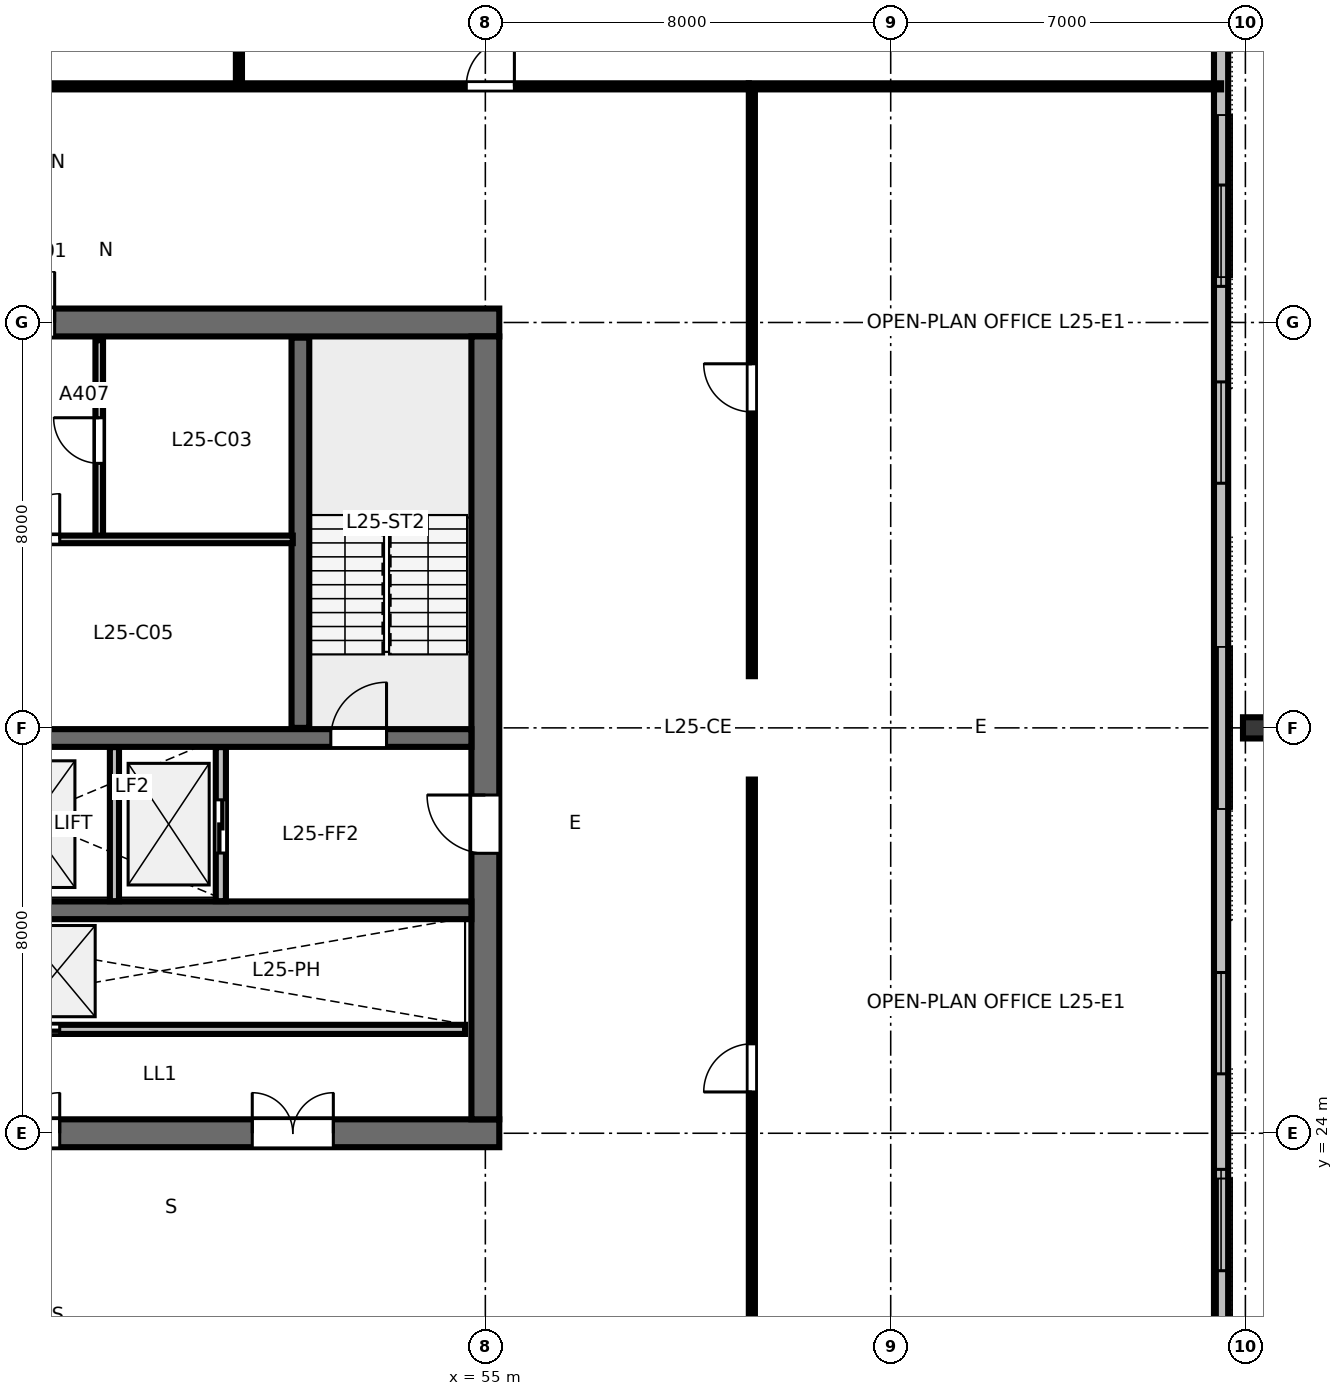
"""IFC4 building model, lengths in metres.
Left out: names, types, materials, properties, quantities, classifications, styles, units other than length and angle.
Written with IfcOpenShell. Run it as: python <this file> out.ifc"""

import sys

from ifc_helpers import new_model, si_unit, direction, frame, frame_2d, origin, origin_2d, place, context, subcontext, project, spatial, rectangle, i_section, extrude, element, fill, save


model = new_model("IFC4")
c1 = context("Model", 3, precision=1e-05, world=origin(), true_north=direction((0.0, 1.0)))
c2 = subcontext(c1, "Body", "Model", "MODEL_VIEW")
j1 = project(units=[si_unit("LENGTHUNIT", "METRE"), si_unit("PLANEANGLEUNIT", "RADIAN")], contexts=[c1])
p1 = place(None, origin())
s1 = spatial("IfcSite", under=j1, at=p1, CompositionType="ELEMENT")
p2 = place(p1, origin())
s2 = spatial("IfcBuilding", under=s1, at=p2, CompositionType="ELEMENT")
p3 = place(p2, frame((0.0, 0.0, 98.8)))
s3 = spatial("IfcBuildingStorey", under=s2, at=p3, CompositionType="ELEMENT", Elevation=98.8)
p4 = place(p3, frame((36.725, 24.0, 0.0), z_axis=(0.0, 0.0, 1.0), x_axis=(1.0, 0.0, 0.0)))
e1 = element("IfcWall", 1, at=p4, inside=s3, PredefinedType="SHEAR", context=c2, shape_type="SweptSolid", body=[
    extrude(rectangle(XDim=18.55, YDim=0.55, at=frame_2d((9.275, 0.0))), origin(), (0.0, 0.0, 1.0), 3.36),
])
p5 = place(p4, frame((8.275, 0.0, 0.0)))
e2 = element("IfcOpeningElement", 2, at=p5, cuts=e1, PredefinedType="OPENING", context=c2, shape_type="SweptSolid", body=[
    extrude(rectangle(XDim=1.6, YDim=2.15, at=frame_2d((0.8, 1.075))), frame((0.0, 0.285, 0.0), z_axis=(0.0, -1.0, 0.0), x_axis=(1.0, 0.0, 0.0)), (0.0, 0.0, 1.0), 0.57),
])
p6 = place(p4, frame((13.675, 0.0, 0.0)))
e3 = element("IfcOpeningElement", 3, at=p6, cuts=e1, PredefinedType="OPENING", context=c2, shape_type="SweptSolid", body=[
    extrude(rectangle(XDim=1.6, YDim=2.15, at=frame_2d((0.8, 1.075))), frame((0.0, 0.285, 0.0), z_axis=(0.0, -1.0, 0.0), x_axis=(1.0, 0.0, 0.0)), (0.0, 0.0, 1.0), 0.57),
])
p7 = place(p3, frame((36.725, 40.0, 0.0), z_axis=(0.0, 0.0, 1.0), x_axis=(1.0, 0.0, 0.0)))
e4 = element("IfcWall", 4, at=p7, inside=s3, PredefinedType="SHEAR", context=c2, shape_type="SweptSolid", body=[
    extrude(rectangle(XDim=18.55, YDim=0.55, at=frame_2d((9.275, 0.0))), origin(), (0.0, 0.0, 1.0), 3.36),
])
p8 = place(p7, frame((8.775, 0.0, 0.0)))
e5 = element("IfcOpeningElement", 5, at=p8, cuts=e4, PredefinedType="OPENING", context=c2, shape_type="SweptSolid", body=[
    extrude(rectangle(XDim=1.0, YDim=2.15, at=frame_2d((0.5, 1.075))), frame((0.0, 0.285, 0.0), z_axis=(0.0, -1.0, 0.0), x_axis=(1.0, 0.0, 0.0)), (0.0, 0.0, 1.0), 0.57),
])
p9 = place(p3, frame((55.0, 24.275, 0.0), z_axis=(0.0, 0.0, 1.0), x_axis=(0.0, 1.0, 0.0)))
e6 = element("IfcWall", 6, at=p9, inside=s3, PredefinedType="SHEAR", context=c2, shape_type="SweptSolid", body=[
    extrude(rectangle(XDim=15.45, YDim=0.55, at=frame_2d((7.725, 0.0))), origin(), (0.0, 0.0, 1.0), 3.36),
])
p10 = place(p9, frame((5.25, 0.0, 0.0)))
e7 = element("IfcOpeningElement", 7, at=p10, cuts=e6, PredefinedType="OPENING", context=c2, shape_type="SweptSolid", body=[
    extrude(rectangle(XDim=1.15, YDim=2.15, at=frame_2d((0.575, 1.075))), frame((0.0, 0.285, 0.0), z_axis=(0.0, -1.0, 0.0), x_axis=(1.0, 0.0, 0.0)), (0.0, 0.0, 1.0), 0.57),
])
p11 = place(p3, frame((37.275, 31.8, 0.0), z_axis=(0.0, 0.0, 1.0), x_axis=(1.0, 0.0, 0.0)))
e8 = element("IfcWall", 8, at=p11, inside=s3, PredefinedType="SHEAR", context=c2, shape_type="SweptSolid", body=[
    extrude(rectangle(XDim=17.45, YDim=0.35, at=frame_2d((8.725, 0.0))), origin(), (0.0, 0.0, 1.0), 3.36),
])
p12 = place(p11, frame((0.775, 0.0, 0.0)))
e9 = element("IfcOpeningElement", 9, at=p12, cuts=e8, PredefinedType="OPENING", context=c2, shape_type="SweptSolid", body=[
    extrude(rectangle(XDim=1.1, YDim=2.15, at=frame_2d((0.55, 1.075))), frame((0.0, 0.185, 0.0), z_axis=(0.0, -1.0, 0.0), x_axis=(1.0, 0.0, 0.0)), (0.0, 0.0, 1.0), 0.37),
])
p13 = place(p11, frame((14.675, 0.0, 0.0)))
e10 = element("IfcOpeningElement", 10, at=p13, cuts=e8, PredefinedType="OPENING", context=c2, shape_type="SweptSolid", body=[
    extrude(rectangle(XDim=1.1, YDim=2.15, at=frame_2d((0.55, 1.075))), frame((0.0, 0.185, 0.0), z_axis=(0.0, -1.0, 0.0), x_axis=(1.0, 0.0, 0.0)), (0.0, 0.0, 1.0), 0.37),
])
p14 = place(p3, frame((37.275, 28.4, 0.0), z_axis=(0.0, 0.0, 1.0), x_axis=(1.0, 0.0, 0.0)))
e11 = element("IfcWall", 11, at=p14, inside=s3, PredefinedType="SHEAR", context=c2, shape_type="SweptSolid", body=[
    extrude(rectangle(XDim=17.45, YDim=0.35, at=frame_2d((8.725, 0.0))), origin(), (0.0, 0.0, 1.0), 3.36),
])
p15 = place(p3, frame((70.18, 32.0, 0.0), z_axis=(0.0, 0.0, 1.0), x_axis=(0.0, 1.0, 0.0)))
e12 = element("IfcColumn", 12, at=p15, inside=s3, PredefinedType="COLUMN", context=c2, shape_type="SweptSolid", body=[
    extrude(i_section(OverallWidth=0.418, OverallDepth=0.455, WebThickness=0.042, FlangeThickness=0.068, FilletRadius=0.025, at=origin_2d()), origin(), (0.0, 0.0, 1.0), 3.358),
])
p16 = place(p3, frame((69.52, 15.36, 0.0), z_axis=(0.0, 0.0, 1.0), x_axis=(0.0, 1.0, 0.0)))
e13 = element("IfcWall", 13, at=p16, inside=s3, PredefinedType="STANDARD", context=c2, shape_type="SweptSolid", body=[
    extrude(rectangle(XDim=33.28, YDim=0.28, at=frame_2d((16.64, 0.0))), origin(), (0.0, 0.0, 1.0), 3.36),
])
p17 = place(p16, frame((5.927, 0.0, 0.8)))
e14 = element("IfcOpeningElement", 14, at=p17, cuts=e13, PredefinedType="OPENING", context=c2, shape_type="SweptSolid", body=[
    extrude(rectangle(XDim=2.0, YDim=1.95, at=frame_2d((1.0, 0.975))), frame((0.0, 0.15, 0.0), z_axis=(0.0, -1.0, 0.0), x_axis=(1.0, 0.0, 0.0)), (0.0, 0.0, 1.0), 0.3),
])
p18 = place(p16, frame((9.812, 0.0, 0.8)))
e15 = element("IfcOpeningElement", 15, at=p18, cuts=e13, PredefinedType="OPENING", context=c2, shape_type="SweptSolid", body=[
    extrude(rectangle(XDim=2.0, YDim=1.95, at=frame_2d((1.0, 0.975))), frame((0.0, 0.15, 0.0), z_axis=(0.0, -1.0, 0.0), x_axis=(1.0, 0.0, 0.0)), (0.0, 0.0, 1.0), 0.3),
])
p19 = place(p16, frame((21.468, 0.0, 0.8)))
e16 = element("IfcOpeningElement", 16, at=p19, cuts=e13, PredefinedType="OPENING", context=c2, shape_type="SweptSolid", body=[
    extrude(rectangle(XDim=2.0, YDim=1.95, at=frame_2d((1.0, 0.975))), frame((0.0, 0.15, 0.0), z_axis=(0.0, -1.0, 0.0), x_axis=(1.0, 0.0, 0.0)), (0.0, 0.0, 1.0), 0.3),
])
p20 = place(p16, frame((25.353, 0.0, 0.8)))
e17 = element("IfcOpeningElement", 17, at=p20, cuts=e13, PredefinedType="OPENING", context=c2, shape_type="SweptSolid", body=[
    extrude(rectangle(XDim=2.0, YDim=1.95, at=frame_2d((1.0, 0.975))), frame((0.0, 0.15, 0.0), z_axis=(0.0, -1.0, 0.0), x_axis=(1.0, 0.0, 0.0)), (0.0, 0.0, 1.0), 0.3),
])
p21 = place(p3, frame((51.35, 32.0, 0.0), z_axis=(0.0, 0.0, 1.0), x_axis=(0.0, 1.0, 0.0)))
e18 = element("IfcWall", 18, at=p21, inside=s3, PredefinedType="SHEAR", context=c2, shape_type="SweptSolid", body=[
    extrude(rectangle(XDim=7.7, YDim=0.35, at=frame_2d((3.85, 0.0))), origin(), (0.0, 0.0, 1.0), 3.6),
])
p22 = place(p3, frame((47.38, 35.72, 0.0), z_axis=(0.0, 0.0, 1.0), x_axis=(0.0, 1.0, 0.0)))
e19 = element("IfcWall", 19, at=p22, inside=s3, PredefinedType="PARTITIONING", context=c2, shape_type="SweptSolid", body=[
    extrude(rectangle(XDim=3.93, YDim=0.15, at=frame_2d((1.965, 0.0))), origin(), (0.0, 0.0, 1.0), 3.36),
])
p23 = place(p22, frame((1.5, 0.0, 0.0)))
e20 = element("IfcOpeningElement", 20, at=p23, cuts=e19, PredefinedType="OPENING", context=c2, shape_type="SweptSolid", body=[
    extrude(rectangle(XDim=0.9, YDim=2.15, at=frame_2d((0.45, 1.075))), frame((0.0, 0.085, 0.0), z_axis=(0.0, -1.0, 0.0), x_axis=(1.0, 0.0, 0.0)), (0.0, 0.0, 1.0), 0.17),
])
p24 = place(p3, frame((40.8, 35.72, 0.0), z_axis=(0.0, 0.0, 1.0), x_axis=(1.0, 0.0, 0.0)))
e21 = element("IfcWall", 21, at=p24, inside=s3, PredefinedType="PARTITIONING", context=c2, shape_type="SweptSolid", body=[
    extrude(rectangle(XDim=10.4, YDim=0.15, at=frame_2d((5.2, 0.0))), origin(), (0.0, 0.0, 1.0), 3.36),
])
p25 = place(p24, frame((4.9, 0.0, 0.0)))
e22 = element("IfcOpeningElement", 22, at=p25, cuts=e21, PredefinedType="OPENING", context=c2, shape_type="SweptSolid", body=[
    extrude(rectangle(XDim=0.9, YDim=2.15, at=frame_2d((0.45, 1.075))), frame((0.0, 0.085, 0.0), z_axis=(0.0, -1.0, 0.0), x_axis=(1.0, 0.0, 0.0)), (0.0, 0.0, 1.0), 0.17),
])
p26 = place(p3, frame((49.78, 28.58, 0.0), z_axis=(0.0, 0.0, 1.0), x_axis=(0.0, 1.0, 0.0)))
e23 = element("IfcWall", 23, at=p26, inside=s3, PredefinedType="PARTITIONING", context=c2, shape_type="SweptSolid", body=[
    extrude(rectangle(XDim=3.04, YDim=0.2, at=frame_2d((1.52, 0.0))), origin(), (0.0, 0.0, 1.0), 3.36),
])
p27 = place(p26, frame((0.95, 0.0, 0.0)))
e24 = element("IfcOpeningElement", 24, at=p27, cuts=e23, PredefinedType="OPENING", context=c2, shape_type="SweptSolid", body=[
    extrude(rectangle(XDim=1.05, YDim=2.15, at=frame_2d((0.525, 1.075))), frame((0.0, 0.11, 0.0), z_axis=(0.0, -1.0, 0.0), x_axis=(1.0, 0.0, 0.0)), (0.0, 0.0, 1.0), 0.22),
])
p28 = place(p3, frame((47.68, 28.58, 0.0), z_axis=(0.0, 0.0, 1.0), x_axis=(0.0, 1.0, 0.0)))
e25 = element("IfcWall", 25, at=p28, inside=s3, PredefinedType="PARTITIONING", context=c2, shape_type="SweptSolid", body=[
    extrude(rectangle(XDim=3.04, YDim=0.18, at=frame_2d((1.52, 0.0))), origin(), (0.0, 0.0, 1.0), 3.36),
])
p29 = place(p3, frame((42.55, 26.05, 0.0), z_axis=(0.0, 0.0, 1.0), x_axis=(1.0, 0.0, 0.0)))
e26 = element("IfcWall", 26, at=p29, inside=s3, PredefinedType="PARTITIONING", context=c2, shape_type="SweptSolid", body=[
    extrude(rectangle(XDim=12.05, YDim=0.18, at=frame_2d((6.025, 0.0))), origin(), (0.0, 0.0, 1.0), 3.36),
])
p30 = place(p29, frame((1.1, 0.0, 0.0)))
e27 = element("IfcOpeningElement", 27, at=p30, cuts=e26, PredefinedType="OPENING", context=c2, shape_type="SweptSolid", body=[
    extrude(rectangle(XDim=1.05, YDim=2.15, at=frame_2d((0.525, 1.075))), frame((0.0, 0.1, 0.0), z_axis=(0.0, -1.0, 0.0), x_axis=(1.0, 0.0, 0.0)), (0.0, 0.0, 1.0), 0.2),
])
p31 = place(p29, frame((3.0, 0.0, 0.0)))
e28 = element("IfcOpeningElement", 28, at=p31, cuts=e26, PredefinedType="OPENING", context=c2, shape_type="SweptSolid", body=[
    extrude(rectangle(XDim=1.05, YDim=2.15, at=frame_2d((0.525, 1.075))), frame((0.0, 0.1, 0.0), z_axis=(0.0, -1.0, 0.0), x_axis=(1.0, 0.0, 0.0)), (0.0, 0.0, 1.0), 0.2),
])
p32 = place(p3, frame((50.137, 44.66, 0.0), z_axis=(0.0, 0.0, 1.0), x_axis=(0.0, 1.0, 0.0)))
e29 = element("IfcWall", 29, at=p32, inside=s3, PredefinedType="PARTITIONING", context=c2, shape_type="SweptSolid", body=[
    extrude(rectangle(XDim=8.06, YDim=0.12, at=frame_2d((4.03, 0.0))), origin(), (0.0, 0.0, 1.0), 2.64),
])
p33 = place(p32, frame((1.4, 0.0, 0.0)))
e30 = element("IfcOpeningElement", 30, at=p33, cuts=e29, PredefinedType="OPENING", context=c2, shape_type="SweptSolid", body=[
    extrude(rectangle(XDim=0.9, YDim=2.15, at=frame_2d((0.45, 1.075))), frame((0.0, 0.07, 0.0), z_axis=(0.0, -1.0, 0.0), x_axis=(1.0, 0.0, 0.0)), (0.0, 0.0, 1.0), 0.14),
])
p34 = place(p3, frame((31.8, 44.66, 0.0), z_axis=(0.0, 0.0, 1.0), x_axis=(1.0, 0.0, 0.0)))
e31 = element("IfcWall", 31, at=p34, inside=s3, PredefinedType="PARTITIONING", context=c2, shape_type="SweptSolid", body=[
    extrude(rectangle(XDim=28.4, YDim=0.12, at=frame_2d((14.2, 0.0))), origin(), (0.0, 0.0, 1.0), 2.64),
])
p35 = place(p34, frame((3.452, 0.0, 0.0)))
e32 = element("IfcOpeningElement", 32, at=p35, cuts=e31, PredefinedType="OPENING", context=c2, shape_type="SweptSolid", body=[
    extrude(rectangle(XDim=0.95, YDim=2.15, at=frame_2d((0.475, 1.075))), frame((0.0, 0.07, 0.0), z_axis=(0.0, -1.0, 0.0), x_axis=(1.0, 0.0, 0.0)), (0.0, 0.0, 1.0), 0.14),
])
p36 = place(p34, frame((12.551, 0.0, 0.0)))
e33 = element("IfcOpeningElement", 33, at=p36, cuts=e31, PredefinedType="OPENING", context=c2, shape_type="SweptSolid", body=[
    extrude(rectangle(XDim=0.95, YDim=2.15, at=frame_2d((0.475, 1.075))), frame((0.0, 0.07, 0.0), z_axis=(0.0, -1.0, 0.0), x_axis=(1.0, 0.0, 0.0)), (0.0, 0.0, 1.0), 0.14),
])
p37 = place(p34, frame((22.823, 0.0, 0.0)))
e34 = element("IfcOpeningElement", 34, at=p37, cuts=e31, PredefinedType="OPENING", context=c2, shape_type="SweptSolid", body=[
    extrude(rectangle(XDim=0.95, YDim=2.15, at=frame_2d((0.475, 1.075))), frame((0.0, 0.07, 0.0), z_axis=(0.0, -1.0, 0.0), x_axis=(1.0, 0.0, 0.0)), (0.0, 0.0, 1.0), 0.14),
])
p38 = place(p3, frame((60.26, 19.4, 0.0), z_axis=(0.0, 0.0, 1.0), x_axis=(0.0, 1.0, 0.0)))
e35 = element("IfcWall", 35, at=p38, inside=s3, PredefinedType="PARTITIONING", context=c2, shape_type="SweptSolid", body=[
    extrude(rectangle(XDim=11.58, YDim=0.12, at=frame_2d((5.79, 0.0))), origin(), (0.0, 0.0, 1.0), 2.64),
])
p39 = place(p38, frame((5.415, 0.0, 0.0)))
e36 = element("IfcOpeningElement", 36, at=p39, cuts=e35, PredefinedType="OPENING", context=c2, shape_type="SweptSolid", body=[
    extrude(rectangle(XDim=0.95, YDim=2.15, at=frame_2d((0.475, 1.075))), frame((0.0, 0.07, 0.0), z_axis=(0.0, -1.0, 0.0), x_axis=(1.0, 0.0, 0.0)), (0.0, 0.0, 1.0), 0.14),
])
p40 = place(p3, frame((60.26, 33.02, 0.0), z_axis=(0.0, 0.0, 1.0), x_axis=(0.0, 1.0, 0.0)))
e37 = element("IfcWall", 37, at=p40, inside=s3, PredefinedType="PARTITIONING", context=c2, shape_type="SweptSolid", body=[
    extrude(rectangle(XDim=11.58, YDim=0.12, at=frame_2d((5.79, 0.0))), origin(), (0.0, 0.0, 1.0), 2.64),
])
p41 = place(p40, frame((5.215, 0.0, 0.0)))
e38 = element("IfcOpeningElement", 38, at=p41, cuts=e37, PredefinedType="OPENING", context=c2, shape_type="SweptSolid", body=[
    extrude(rectangle(XDim=0.95, YDim=2.15, at=frame_2d((0.475, 1.075))), frame((0.0, 0.07, 0.0), z_axis=(0.0, -1.0, 0.0), x_axis=(1.0, 0.0, 0.0)), (0.0, 0.0, 1.0), 0.14),
])
p42 = place(p3, frame((60.2, 44.66, 0.0), z_axis=(0.0, 0.0, 1.0), x_axis=(1.0, 0.0, 0.0)))
e39 = element("IfcWall", 39, at=p42, inside=s3, PredefinedType="PARTITIONING", context=c2, shape_type="SweptSolid", body=[
    extrude(rectangle(XDim=9.32, YDim=0.12, at=frame_2d((4.66, 0.0))), origin(), (0.0, 0.0, 1.0), 2.64),
])
p43 = place(p17, origin())
e40 = element("IfcWindow", 40, at=p43, inside=s3, PartitioningType="SINGLE_PANEL", PredefinedType="WINDOW", context=c2, shape_type="SweptSolid", body=[
    extrude(rectangle(XDim=2.0, YDim=1.95, at=frame_2d((1.0, 0.975))), frame((0.0, 0.03, 0.0), z_axis=(0.0, -1.0, 0.0), x_axis=(1.0, 0.0, 0.0)), (0.0, 0.0, 1.0), 0.06),
])
fill(e14, e40)
p44 = place(p18, origin())
e41 = element("IfcWindow", 41, at=p44, inside=s3, PartitioningType="SINGLE_PANEL", PredefinedType="WINDOW", context=c2, shape_type="SweptSolid", body=[
    extrude(rectangle(XDim=2.0, YDim=1.95, at=frame_2d((1.0, 0.975))), frame((0.0, 0.03, 0.0), z_axis=(0.0, -1.0, 0.0), x_axis=(1.0, 0.0, 0.0)), (0.0, 0.0, 1.0), 0.06),
])
fill(e15, e41)
p45 = place(p19, origin())
e42 = element("IfcWindow", 42, at=p45, inside=s3, PartitioningType="SINGLE_PANEL", PredefinedType="WINDOW", context=c2, shape_type="SweptSolid", body=[
    extrude(rectangle(XDim=2.0, YDim=1.95, at=frame_2d((1.0, 0.975))), frame((0.0, 0.03, 0.0), z_axis=(0.0, -1.0, 0.0), x_axis=(1.0, 0.0, 0.0)), (0.0, 0.0, 1.0), 0.06),
])
fill(e16, e42)
p46 = place(p20, origin())
e43 = element("IfcWindow", 43, at=p46, inside=s3, PartitioningType="SINGLE_PANEL", PredefinedType="WINDOW", context=c2, shape_type="SweptSolid", body=[
    extrude(rectangle(XDim=2.0, YDim=1.95, at=frame_2d((1.0, 0.975))), frame((0.0, 0.03, 0.0), z_axis=(0.0, -1.0, 0.0), x_axis=(1.0, 0.0, 0.0)), (0.0, 0.0, 1.0), 0.06),
])
fill(e17, e43)
p47 = place(p13, origin())
e44 = element("IfcDoor", 44, at=p47, inside=s3, OperationType="SINGLE_SWING_RIGHT", PredefinedType="DOOR", context=c2, shape_type="SweptSolid", body=[
    extrude(rectangle(XDim=1.1, YDim=2.15, at=frame_2d((0.55, 1.075))), frame((0.0, 0.025, 0.0), z_axis=(0.0, -1.0, 0.0), x_axis=(1.0, 0.0, 0.0)), (0.0, 0.0, 1.0), 0.05),
])
fill(e10, e44)
p48 = place(p8, origin())
e45 = element("IfcDoor", 45, at=p48, inside=s3, OperationType="SINGLE_SWING_RIGHT", PredefinedType="DOOR", context=c2, shape_type="SweptSolid", body=[
    extrude(rectangle(XDim=1.0, YDim=2.15, at=frame_2d((0.5, 1.075))), frame((0.0, 0.025, 0.0), z_axis=(0.0, -1.0, 0.0), x_axis=(1.0, 0.0, 0.0)), (0.0, 0.0, 1.0), 0.05),
])
fill(e5, e45)
p49 = place(p10, origin())
e46 = element("IfcDoor", 46, at=p49, inside=s3, OperationType="SINGLE_SWING_RIGHT", PredefinedType="DOOR", context=c2, shape_type="SweptSolid", body=[
    extrude(rectangle(XDim=1.15, YDim=2.15, at=frame_2d((0.575, 1.075))), frame((0.0, 0.025, 0.0), z_axis=(0.0, -1.0, 0.0), x_axis=(1.0, 0.0, 0.0)), (0.0, 0.0, 1.0), 0.05),
])
fill(e7, e46)
p50 = place(p5, origin())
e47 = element("IfcDoor", 47, at=p50, inside=s3, OperationType="DOUBLE_DOOR_SINGLE_SWING", PredefinedType="DOOR", context=c2, shape_type="SweptSolid", body=[
    extrude(rectangle(XDim=1.6, YDim=2.15, at=frame_2d((0.8, 1.075))), frame((0.0, 0.025, 0.0), z_axis=(0.0, -1.0, 0.0), x_axis=(1.0, 0.0, 0.0)), (0.0, 0.0, 1.0), 0.05),
])
fill(e2, e47)
p51 = place(p6, origin())
e48 = element("IfcDoor", 48, at=p51, inside=s3, OperationType="DOUBLE_DOOR_SINGLE_SWING", PredefinedType="DOOR", context=c2, shape_type="SweptSolid", body=[
    extrude(rectangle(XDim=1.6, YDim=2.15, at=frame_2d((0.8, 1.075))), frame((0.0, 0.025, 0.0), z_axis=(0.0, -1.0, 0.0), x_axis=(1.0, 0.0, 0.0)), (0.0, 0.0, 1.0), 0.05),
])
fill(e3, e48)
p52 = place(p23, origin())
e49 = element("IfcDoor", 49, at=p52, inside=s3, OperationType="SINGLE_SWING_RIGHT", PredefinedType="DOOR", context=c2, shape_type="SweptSolid", body=[
    extrude(rectangle(XDim=0.9, YDim=2.15, at=frame_2d((0.45, 1.075))), frame((0.0, 0.025, 0.0), z_axis=(0.0, -1.0, 0.0), x_axis=(1.0, 0.0, 0.0)), (0.0, 0.0, 1.0), 0.05),
])
fill(e20, e49)
p53 = place(p25, origin())
e50 = element("IfcDoor", 50, at=p53, inside=s3, OperationType="SINGLE_SWING_RIGHT", PredefinedType="DOOR", context=c2, shape_type="SweptSolid", body=[
    extrude(rectangle(XDim=0.9, YDim=2.15, at=frame_2d((0.45, 1.075))), frame((0.0, 0.025, 0.0), z_axis=(0.0, -1.0, 0.0), x_axis=(1.0, 0.0, 0.0)), (0.0, 0.0, 1.0), 0.05),
])
fill(e22, e50)
p54 = place(p27, origin())
e51 = element("IfcDoor", 51, at=p54, inside=s3, OperationType="SLIDING_TO_RIGHT", PredefinedType="DOOR", context=c2, shape_type="SweptSolid", body=[
    extrude(rectangle(XDim=1.05, YDim=2.15, at=frame_2d((0.525, 1.075))), frame((0.0, 0.025, 0.0), z_axis=(0.0, -1.0, 0.0), x_axis=(1.0, 0.0, 0.0)), (0.0, 0.0, 1.0), 0.05),
])
fill(e24, e51)
p55 = place(p31, origin())
e52 = element("IfcDoor", 52, at=p55, inside=s3, OperationType="SLIDING_TO_RIGHT", PredefinedType="DOOR", context=c2, shape_type="SweptSolid", body=[
    extrude(rectangle(XDim=1.05, YDim=2.15, at=frame_2d((0.525, 1.075))), frame((0.0, 0.025, 0.0), z_axis=(0.0, -1.0, 0.0), x_axis=(1.0, 0.0, 0.0)), (0.0, 0.0, 1.0), 0.05),
])
fill(e28, e52)
p56 = place(p37, origin())
e53 = element("IfcDoor", 53, at=p56, inside=s3, OperationType="SINGLE_SWING_RIGHT", PredefinedType="DOOR", context=c2, shape_type="SweptSolid", body=[
    extrude(rectangle(XDim=0.95, YDim=2.15, at=frame_2d((0.475, 1.075))), frame((0.0, 0.025, 0.0), z_axis=(0.0, -1.0, 0.0), x_axis=(1.0, 0.0, 0.0)), (0.0, 0.0, 1.0), 0.05),
])
fill(e34, e53)
p57 = place(p39, origin())
e54 = element("IfcDoor", 54, at=p57, inside=s3, OperationType="SINGLE_SWING_LEFT", PredefinedType="DOOR", context=c2, shape_type="SweptSolid", body=[
    extrude(rectangle(XDim=0.95, YDim=2.15, at=frame_2d((0.475, 1.075))), frame((0.0, 0.025, 0.0), z_axis=(0.0, -1.0, 0.0), x_axis=(1.0, 0.0, 0.0)), (0.0, 0.0, 1.0), 0.05),
])
fill(e36, e54)
p58 = place(p41, origin())
e55 = element("IfcDoor", 55, at=p58, inside=s3, OperationType="SINGLE_SWING_RIGHT", PredefinedType="DOOR", context=c2, shape_type="SweptSolid", body=[
    extrude(rectangle(XDim=0.95, YDim=2.15, at=frame_2d((0.475, 1.075))), frame((0.0, 0.025, 0.0), z_axis=(0.0, -1.0, 0.0), x_axis=(1.0, 0.0, 0.0)), (0.0, 0.0, 1.0), 0.05),
])
fill(e38, e55)
save(model, sys.argv[1])
